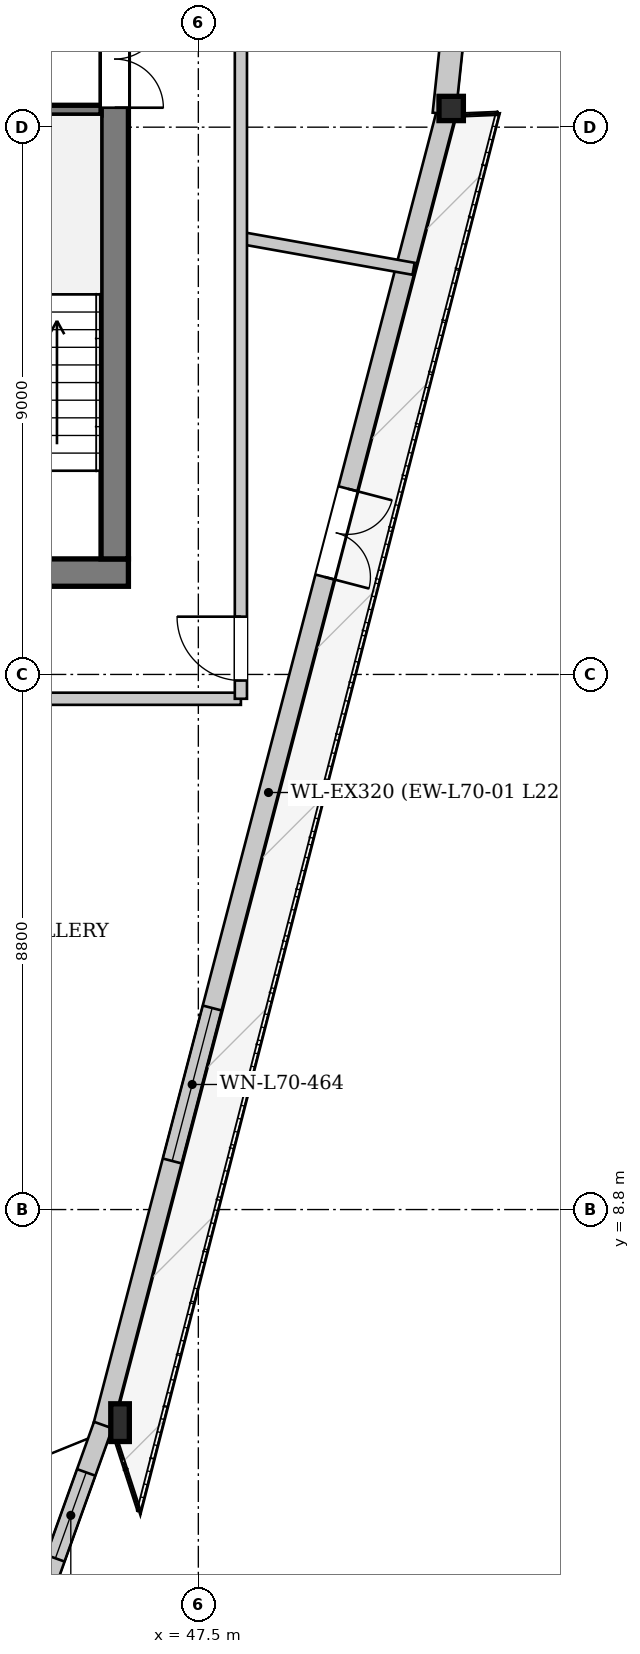
"""IFC4 building model, lengths in metres.
Left out: names, types, materials, properties, quantities, classifications, styles, units other than length and angle.
Written with IfcOpenShell. Run it as: python <this file> out.ifc"""

import sys

from ifc_helpers import new_model, si_unit, direction, frame, frame_2d, origin, origin_2d, place, context, subcontext, project, spatial, rectangle, i_section, extrude, source, transform, mapped, element, fill, save


model = new_model("IFC4")
c1 = context("Model", 3, precision=1e-05, world=origin(), true_north=direction((0.0, 1.0)))
c2 = subcontext(c1, "Body", "Model", "MODEL_VIEW")
j1 = project(units=[si_unit("LENGTHUNIT", "METRE"), si_unit("PLANEANGLEUNIT", "RADIAN")], contexts=[c1])
p1 = place(None, origin())
s1 = spatial("IfcSite", under=j1, at=p1, CompositionType="ELEMENT")
p2 = place(p1, origin())
s2 = spatial("IfcBuilding", under=s1, at=p2, CompositionType="ELEMENT")
p3 = place(p2, frame((0.0, 0.0, 263.3)))
s3 = spatial("IfcBuildingStorey", under=s2, at=p3, CompositionType="ELEMENT", Elevation=263.3)
m1 = source(origin(), c2, "Body", "SweptSolid", [
    extrude(i_section(OverallWidth=0.305, OverallDepth=0.62, WebThickness=0.021, FlangeThickness=0.04, at=origin_2d()), origin(), (0.0, 0.0, 1.0), 3.449),
])
p4 = place(p3, frame((46.086, 5.202, 0.0), z_axis=(0.07360549053, 0.054496372796, 0.995797357456), x_axis=(-0.595042724126, 0.80369406895, 0.0)))
e1 = element("IfcColumn", 1, at=p4, inside=s3, PredefinedType="COLUMN", context=c2, shape_type="MappedRepresentation", body=[
    mapped(m1, transform((0.0, 0.0, 0.0), x_axis=(1.0, 0.0, 0.0), y_axis=(0.0, 1.0, 0.0), z_axis=(0.0, 0.0, 1.0), scale=1.0)),
])
m2 = source(origin(), c2, "Body", "SweptSolid", [
    extrude(i_section(OverallWidth=0.401, OverallDepth=0.399, WebThickness=0.022, FlangeThickness=0.034, at=origin_2d()), origin(), (0.0, 0.0, 1.0), 3.445),
])
p5 = place(p3, frame((51.732, 26.798, 0.0), z_axis=(-0.042519230303, 0.063495383919, 0.997075950605), x_axis=(-0.830907176976, -0.55641105601, 0.0)))
e2 = element("IfcColumn", 2, at=p5, inside=s3, PredefinedType="COLUMN", context=c2, shape_type="MappedRepresentation", body=[
    mapped(m2, transform((0.0, 0.0, 0.0), x_axis=(1.0, 0.0, 0.0), y_axis=(0.0, 1.0, 0.0), z_axis=(0.0, 0.0, 1.0), scale=1.0)),
])
p6 = place(p3, frame((51.577, 26.839, 0.0), z_axis=(0.0, 0.0, 1.0), x_axis=(-0.252928525252, -0.967484966867, 0.0)))
e3 = element("IfcWall", 3, at=p6, inside=s3, PredefinedType="SOLIDWALL", context=c2, shape_type="SweptSolid", body=[
    extrude(rectangle(XDim=22.323, YDim=0.32, at=frame_2d((11.161, 0.0))), origin(), (0.0, 0.0, 1.0), 2.872),
])
p7 = place(p6, frame((6.393, 0.0, 0.0)))
e4 = element("IfcOpeningElement", 4, at=p7, cuts=e3, PredefinedType="OPENING", context=c2, shape_type="SweptSolid", body=[
    extrude(rectangle(XDim=1.5, YDim=2.3, at=frame_2d((0.75, 1.15))), frame((0.0, 0.17, 0.0), z_axis=(0.0, -1.0, 0.0), x_axis=(1.0, 0.0, 0.0)), (0.0, 0.0, 1.0), 0.34),
])
p8 = place(p6, frame((15.219, 0.0, 0.402)))
e5 = element("IfcOpeningElement", 5, at=p8, cuts=e3, PredefinedType="OPENING", context=c2, shape_type="SweptSolid", body=[
    extrude(rectangle(XDim=2.6, YDim=2.35, at=frame_2d((1.3, 1.175))), frame((0.0, 0.17, 0.0), z_axis=(0.0, -1.0, 0.0), x_axis=(1.0, 0.0, 0.0)), (0.0, 0.0, 1.0), 0.34),
])
p9 = place(p3, frame((45.935, 5.256, 0.0), z_axis=(0.0, 0.0, 1.0), x_axis=(-0.337650240758, -0.941271647781, 0.0)))
e6 = element("IfcWall", 6, at=p9, inside=s3, PredefinedType="SOLIDWALL", context=c2, shape_type="SweptSolid", body=[
    extrude(rectangle(XDim=3.154, YDim=0.32, at=frame_2d((1.577, 0.0))), origin(), (0.0, 0.0, 1.0), 2.872),
])
p10 = place(p9, frame((0.827, 0.0, 0.452)))
e7 = element("IfcOpeningElement", 7, at=p10, cuts=e6, PredefinedType="OPENING", context=c2, shape_type="SweptSolid", body=[
    extrude(rectangle(XDim=1.5, YDim=2.3, at=frame_2d((0.75, 1.15))), frame((0.0, 0.17, 0.0), z_axis=(0.0, -1.0, 0.0), x_axis=(1.0, 0.0, 0.0)), (0.0, 0.0, 1.0), 0.34),
])
p11 = place(p3, frame((45.158, 2.315, 0.0), z_axis=(0.0, 0.0, 1.0), x_axis=(-0.516260260774, 0.856431750431, 0.0)))
e8 = element("IfcWall", 8, at=p11, inside=s3, PredefinedType="SOLIDWALL", context=c2, shape_type="SweptSolid", body=[
    extrude(rectangle(XDim=2.379, YDim=0.32, at=frame_2d((1.189, 0.0))), origin(), (0.0, 0.0, 1.0), 2.872),
])
p12 = place(p3, frame((53.896, 49.017, 0.0), z_axis=(0.0, 0.0, 1.0), x_axis=(-0.105399254058, -0.994429986095, 0.0)))
e9 = element("IfcWall", 9, at=p12, inside=s3, PredefinedType="SOLIDWALL", context=c2, shape_type="SweptSolid", body=[
    extrude(rectangle(XDim=22.323, YDim=0.38, at=frame_2d((11.161, 0.0))), origin(), (0.0, 0.0, 1.0), 2.872),
])
p13 = place(p12, frame((5.65, 0.0, 0.65)))
e10 = element("IfcOpeningElement", 10, at=p13, cuts=e9, PredefinedType="OPENING", context=c2, shape_type="SweptSolid", body=[
    extrude(rectangle(XDim=1.2, YDim=1.5, at=frame_2d((0.6, 0.75))), frame((0.0, 0.2, 0.0), z_axis=(0.0, -1.0, 0.0), x_axis=(1.0, 0.0, 0.0)), (0.0, 0.0, 1.0), 0.4),
])
p14 = place(p12, frame((15.472, 0.0, 0.65)))
e11 = element("IfcOpeningElement", 11, at=p14, cuts=e9, PredefinedType="OPENING", context=c2, shape_type="SweptSolid", body=[
    extrude(rectangle(XDim=1.2, YDim=1.5, at=frame_2d((0.6, 0.75))), frame((0.0, 0.2, 0.0), z_axis=(0.0, -1.0, 0.0), x_axis=(1.0, 0.0, 0.0)), (0.0, 0.0, 1.0), 0.4),
])
p15 = place(p3, frame((46.35, 19.275, 0.0), z_axis=(0.0, 0.0, 1.0), x_axis=(-1.0, 0.0, 0.0)))
e12 = element("IfcWall", 12, at=p15, inside=s3, PredefinedType="SHEAR", context=c2, shape_type="SweptSolid", body=[
    extrude(rectangle(XDim=16.7, YDim=0.45, at=frame_2d((8.35, 0.0))), origin(), (0.0, 0.0, 1.0), 3.38),
])
p16 = place(p15, frame((4.55, 0.0, 0.0)))
e13 = element("IfcOpeningElement", 13, at=p16, cuts=e12, PredefinedType="OPENING", context=c2, shape_type="SweptSolid", body=[
    extrude(rectangle(XDim=1.12, YDim=2.25, at=frame_2d((0.56, 1.125))), frame((0.0, 0.235, 0.0), z_axis=(0.0, -1.0, 0.0), x_axis=(1.0, 0.0, 0.0)), (0.0, 0.0, 1.0), 0.47),
])
p17 = place(p15, frame((11.05, 0.0, 0.0)))
e14 = element("IfcOpeningElement", 14, at=p17, cuts=e12, PredefinedType="OPENING", context=c2, shape_type="SweptSolid", body=[
    extrude(rectangle(XDim=1.12, YDim=2.25, at=frame_2d((0.56, 1.125))), frame((0.0, 0.235, 0.0), z_axis=(0.0, -1.0, 0.0), x_axis=(1.0, 0.0, 0.0)), (0.0, 0.0, 1.0), 0.47),
])
p18 = place(p3, frame((46.125, 33.7, 0.0), z_axis=(0.0, 0.0, 1.0), x_axis=(0.0, -1.0, 0.0)))
e15 = element("IfcWall", 15, at=p18, inside=s3, PredefinedType="SHEAR", context=c2, shape_type="SweptSolid", body=[
    extrude(rectangle(XDim=14.2, YDim=0.45, at=frame_2d((7.1, 0.0))), origin(), (0.0, 0.0, 1.0), 3.38),
])
p19 = place(p18, frame((5.18, 0.0, 0.0)))
e16 = element("IfcOpeningElement", 16, at=p19, cuts=e15, PredefinedType="OPENING", context=c2, shape_type="SweptSolid", body=[
    extrude(rectangle(XDim=1.6, YDim=2.2, at=frame_2d((0.8, 1.1))), frame((0.0, 0.235, 0.0), z_axis=(0.0, -1.0, 0.0), x_axis=(1.0, 0.0, 0.0)), (0.0, 0.0, 1.0), 0.47),
])
p20 = place(p18, frame((2.05, 0.0, 0.0)))
e17 = element("IfcOpeningElement", 17, at=p20, cuts=e15, PredefinedType="OPENING", context=c2, shape_type="SweptSolid", body=[
    extrude(rectangle(XDim=0.95, YDim=2.1, at=frame_2d((0.475, 1.05))), frame((0.0, 0.235, 0.0), z_axis=(0.0, -1.0, 0.0), x_axis=(1.0, 0.0, 0.0)), (0.0, 0.0, 1.0), 0.47),
])
p21 = place(p3, frame((42.88, 26.88, 0.0), z_axis=(0.0, 0.0, 1.0), x_axis=(1.0, 0.0, 0.0)))
e18 = element("IfcWall", 18, at=p21, inside=s3, PredefinedType="PARTITIONING", context=c2, shape_type="SweptSolid", body=[
    extrude(rectangle(XDim=3.02, YDim=0.16, at=frame_2d((1.51, 0.0))), origin(), (0.0, 0.0, 1.0), 3.38),
])
p22 = place(p3, frame((48.2, 24.778, 0.0), z_axis=(0.0, 0.0, 1.0), x_axis=(0.984415019737, -0.175860936298, 0.0)))
e19 = element("IfcWall", 19, at=p22, inside=s3, PredefinedType="PARTITIONING", context=c2, shape_type="SweptSolid", body=[
    extrude(rectangle(XDim=2.885, YDim=0.2, at=frame_2d((1.442, 0.0))), origin(), (0.0, 0.0, 1.0), 3.38),
])
p23 = place(p3, frame((27.8, 17.2, 0.0), z_axis=(0.0, 0.0, 1.0), x_axis=(1.0, 0.0, 0.0)))
e20 = element("IfcWall", 20, at=p23, inside=s3, PredefinedType="PARTITIONING", context=c2, shape_type="SweptSolid", body=[
    extrude(rectangle(XDim=20.4, YDim=0.2, at=frame_2d((10.2, 0.0))), origin(), (0.0, 0.0, 1.0), 3.38),
])
p24 = place(p23, frame((4.91, 0.0, 0.0)))
e21 = element("IfcOpeningElement", 21, at=p24, cuts=e20, PredefinedType="OPENING", context=c2, shape_type="SweptSolid", body=[
    extrude(rectangle(XDim=1.05, YDim=2.2, at=frame_2d((0.525, 1.1))), frame((0.0, 0.11, 0.0), z_axis=(0.0, -1.0, 0.0), x_axis=(1.0, 0.0, 0.0)), (0.0, 0.0, 1.0), 0.22),
])
p25 = place(p3, frame((48.2, 17.2, 0.0), z_axis=(0.0, 0.0, 1.0), x_axis=(0.0, 1.0, 0.0)))
e22 = element("IfcWall", 22, at=p25, inside=s3, PredefinedType="PARTITIONING", context=c2, shape_type="SweptSolid", body=[
    extrude(rectangle(XDim=18.8, YDim=0.2, at=frame_2d((9.4, 0.0))), origin(), (0.0, 0.0, 1.0), 3.005),
])
p26 = place(p25, frame((0.3, 0.0, 0.0)))
e23 = element("IfcOpeningElement", 23, at=p26, cuts=e22, PredefinedType="OPENING", context=c2, shape_type="SweptSolid", body=[
    extrude(rectangle(XDim=1.05, YDim=2.2, at=frame_2d((0.525, 1.1))), frame((0.0, 0.11, 0.0), z_axis=(0.0, -1.0, 0.0), x_axis=(1.0, 0.0, 0.0)), (0.0, 0.0, 1.0), 0.22),
])
p27 = place(p25, frame((13.705, 0.0, 0.0)))
e24 = element("IfcOpeningElement", 24, at=p27, cuts=e22, PredefinedType="OPENING", context=c2, shape_type="SweptSolid", body=[
    extrude(rectangle(XDim=1.05, YDim=2.2, at=frame_2d((0.525, 1.1))), frame((0.0, 0.11, 0.0), z_axis=(0.0, -1.0, 0.0), x_axis=(1.0, 0.0, 0.0)), (0.0, 0.0, 1.0), 0.22),
])
m3 = source(origin(), c2, "Body", "SweptSolid", [
    extrude(rectangle(XDim=1.5, YDim=2.3, at=frame_2d((0.75, 1.15))), frame((0.0, 0.025, 0.0), z_axis=(0.0, -1.0, 0.0), x_axis=(1.0, 0.0, 0.0)), (0.0, 0.0, 1.0), 0.05),
])
p28 = place(p7, origin())
e25 = element("IfcDoor", 25, at=p28, inside=s3, OperationType="DOUBLE_DOOR_SINGLE_SWING", PredefinedType="DOOR", context=c2, shape_type="MappedRepresentation", body=[
    mapped(m3, transform((0.0, 0.0, 0.0), x_axis=(1.0, 0.0, 0.0), y_axis=(0.0, 1.0, 0.0), z_axis=(0.0, 0.0, 1.0), scale=1.0)),
])
fill(e4, e25)
m4 = source(origin(), c2, "Body", "SweptSolid", [
    extrude(rectangle(XDim=2.6, YDim=2.35, at=frame_2d((1.3, 1.175))), frame((0.0, 0.03, 0.0), z_axis=(0.0, -1.0, 0.0), x_axis=(1.0, 0.0, 0.0)), (0.0, 0.0, 1.0), 0.06),
])
p29 = place(p8, origin())
e26 = element("IfcWindow", 26, at=p29, inside=s3, PartitioningType="SINGLE_PANEL", PredefinedType="WINDOW", context=c2, shape_type="MappedRepresentation", body=[
    mapped(m4, transform((0.0, 0.0, 0.0), x_axis=(1.0, 0.0, 0.0), y_axis=(0.0, 1.0, 0.0), z_axis=(0.0, 0.0, 1.0), scale=1.0)),
])
fill(e5, e26)
m5 = source(origin(), c2, "Body", "SweptSolid", [
    extrude(rectangle(XDim=1.5, YDim=2.3, at=frame_2d((0.75, 1.15))), frame((0.0, 0.03, 0.0), z_axis=(0.0, -1.0, 0.0), x_axis=(1.0, 0.0, 0.0)), (0.0, 0.0, 1.0), 0.06),
])
p30 = place(p10, origin())
e27 = element("IfcWindow", 27, at=p30, inside=s3, PartitioningType="SINGLE_PANEL", PredefinedType="WINDOW", context=c2, shape_type="MappedRepresentation", body=[
    mapped(m5, transform((0.0, 0.0, 0.0), x_axis=(1.0, 0.0, 0.0), y_axis=(0.0, 1.0, 0.0), z_axis=(0.0, 0.0, 1.0), scale=1.0)),
])
fill(e7, e27)
m6 = source(origin(), c2, "Body", "SweptSolid", [
    extrude(rectangle(XDim=1.6, YDim=2.2, at=frame_2d((0.8, 1.1))), frame((0.0, 0.025, 0.0), z_axis=(0.0, -1.0, 0.0), x_axis=(1.0, 0.0, 0.0)), (0.0, 0.0, 1.0), 0.05),
])
p31 = place(p19, origin())
e28 = element("IfcDoor", 28, at=p31, inside=s3, OperationType="DOUBLE_DOOR_SINGLE_SWING", PredefinedType="DOOR", context=c2, shape_type="MappedRepresentation", body=[
    mapped(m6, transform((0.0, 0.0, 0.0), x_axis=(1.0, 0.0, 0.0), y_axis=(0.0, 1.0, 0.0), z_axis=(0.0, 0.0, 1.0), scale=1.0)),
])
fill(e16, e28)
m7 = source(origin(), c2, "Body", "SweptSolid", [
    extrude(rectangle(XDim=1.05, YDim=2.2, at=frame_2d((0.525, 1.1))), frame((0.0, 0.025, 0.0), z_axis=(0.0, -1.0, 0.0), x_axis=(1.0, 0.0, 0.0)), (0.0, 0.0, 1.0), 0.05),
])
p32 = place(p26, origin())
e29 = element("IfcDoor", 29, at=p32, inside=s3, OperationType="SINGLE_SWING_RIGHT", PredefinedType="DOOR", context=c2, shape_type="MappedRepresentation", body=[
    mapped(m7, transform((0.0, 0.0, 0.0), x_axis=(1.0, 0.0, 0.0), y_axis=(0.0, 1.0, 0.0), z_axis=(0.0, 0.0, 1.0), scale=1.0)),
])
fill(e23, e29)
save(model, sys.argv[1])
